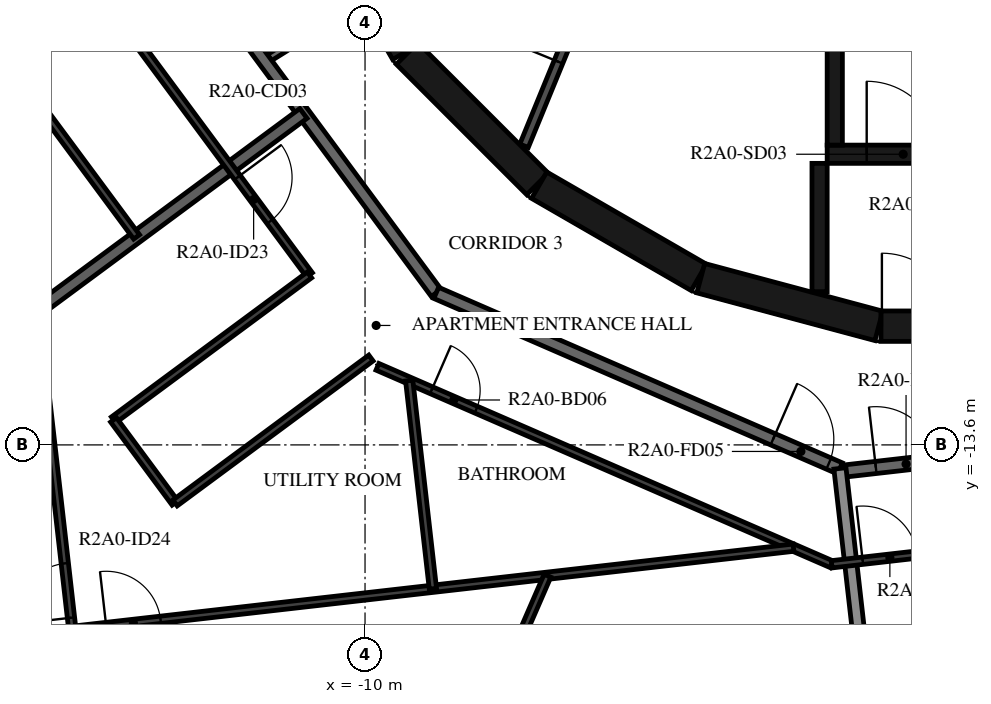
"""IFC4 building model, lengths in metres.
Left out: names, types, materials, properties, quantities, classifications, styles, units other than length and angle.
Written with IfcOpenShell. Run it as: python <this file> out.ifc"""

import sys

from ifc_helpers import new_model, si_unit, direction, frame, frame_2d, origin, place, context, subcontext, project, spatial, rectangle, extrude, element, fill, save


model = new_model("IFC4")
c1 = context("Model", 3, precision=1e-05, world=origin(), true_north=direction((0.0, 1.0)))
c2 = subcontext(c1, "Body", "Model", "MODEL_VIEW")
j1 = project(units=[si_unit("LENGTHUNIT", "METRE"), si_unit("PLANEANGLEUNIT", "RADIAN")], contexts=[c1])
p1 = place(None, origin())
s1 = spatial("IfcSite", under=j1, at=p1, CompositionType="ELEMENT")
p2 = place(p1, origin())
s2 = spatial("IfcBuilding", under=s1, at=p2, CompositionType="ELEMENT")
p3 = place(p2, frame((0.0, 0.0, 83.7)))
s3 = spatial("IfcBuildingStorey", under=s2, at=p3, CompositionType="ELEMENT", Elevation=83.7)
p4 = place(p3, frame((-10.845, -4.51, 0.0), z_axis=(0.0, 0.0, 1.0), x_axis=(0.500087131594, -0.865975092491, 0.0)))
e1 = element("IfcWall", 1, at=p4, inside=s3, PredefinedType="SHEAR", context=c2, shape_type="SweptSolid", body=[
    extrude(rectangle(XDim=3.033, YDim=0.5, at=frame_2d((1.516, 0.0))), origin(), (0.0, 0.0, 1.0), 3.12),
])
p5 = place(p3, frame((-9.308, -7.164, 0.0), z_axis=(0.0, 0.0, 1.0), x_axis=(0.707106781187, -0.707106781187, 0.0)))
e2 = element("IfcWall", 2, at=p5, inside=s3, PredefinedType="SHEAR", context=c2, shape_type="SweptSolid", body=[
    extrude(rectangle(XDim=3.032, YDim=0.5, at=frame_2d((1.516, 0.0))), origin(), (0.0, 0.0, 1.0), 3.12),
])
for number, where, z_axis, x_axis in (
    (3, (-7.137, -9.329, 0.0), (0.0, 0.0, 1.0), (0.866, -0.5, 0.0)),
    (4, (-4.479, -10.858, 0.0), (0.0, 0.0, 1.0), (0.966, -0.259, 0.0)),
):
    element("IfcWall", number, at=place(p3, frame(where, z_axis=z_axis, x_axis=x_axis)), inside=s3, PredefinedType="SHEAR", context=c2, shape_type="SweptSolid", body=[
        extrude(rectangle(XDim=3.033, YDim=0.5, at=frame_2d((1.516, 0.0))), origin(), (0.0, 0.0, 1.0), 3.12),
    ])
p6 = place(p3, frame((-1.516, -11.647, 0.0), z_axis=(0.0, 0.0, 1.0), x_axis=(1.0, 0.0, 0.0)))
e5 = element("IfcWall", 5, at=p6, inside=s3, PredefinedType="SHEAR", context=c2, shape_type="SweptSolid", body=[
    extrude(rectangle(XDim=3.033, YDim=0.5, at=frame_2d((1.516, 0.0))), origin(), (0.0, 0.0, 1.0), 3.12),
])
p7 = place(p6, frame((0.016, 0.0, 0.0)))
e6 = element("IfcOpeningElement", 6, at=p7, cuts=e5, PredefinedType="OPENING", context=c2, shape_type="SweptSolid", body=[
    extrude(rectangle(XDim=1.2, YDim=2.1, at=frame_2d((0.6, 1.05))), frame((0.0, 0.26, 0.0), z_axis=(0.0, -1.0, 0.0), x_axis=(1.0, 0.0, 0.0)), (0.0, 0.0, 1.0), 0.52),
])
p8 = place(p3, frame((-2.275, -8.67, 0.0), z_axis=(0.0, 0.0, 1.0), x_axis=(0.0, 1.0, 0.0)))
e7 = element("IfcWall", 7, at=p8, inside=s3, PredefinedType="SHEAR", context=c2, shape_type="SweptSolid", body=[
    extrude(rectangle(XDim=3.32, YDim=0.25, at=frame_2d((1.66, 0.0))), origin(), (0.0, 0.0, 1.0), 3.12),
])
p9 = place(p3, frame((-2.4, -8.82, 0.0), z_axis=(0.0, 0.0, 1.0), x_axis=(1.0, 0.0, 0.0)))
e8 = element("IfcWall", 8, at=p9, inside=s3, PredefinedType="SHEAR", context=c2, shape_type="SweptSolid", body=[
    extrude(rectangle(XDim=2.5, YDim=0.3, at=frame_2d((1.25, 0.0))), origin(), (0.0, 0.0, 1.0), 3.12),
])
p10 = place(p9, frame((0.65, 0.0, 0.0)))
e9 = element("IfcOpeningElement", 9, at=p10, cuts=e8, PredefinedType="OPENING", context=c2, shape_type="SweptSolid", body=[
    extrude(rectangle(XDim=1.2, YDim=2.1, at=frame_2d((0.6, 1.05))), frame((0.0, 0.16, 0.0), z_axis=(0.0, -1.0, 0.0), x_axis=(1.0, 0.0, 0.0)), (0.0, 0.0, 1.0), 0.32),
])
p11 = place(p3, frame((-2.525, -8.97, 0.0), z_axis=(0.0, 0.0, 1.0), x_axis=(0.0, -1.0, 0.0)))
e10 = element("IfcWall", 10, at=p11, inside=s3, PredefinedType="SHEAR", context=c2, shape_type="SweptSolid", body=[
    extrude(rectangle(XDim=2.11, YDim=0.25, at=frame_2d((1.055, 0.0))), origin(), (0.0, 0.0, 1.0), 3.12),
])
p12 = place(p3, frame((-7.385, -8.681, 0.0), z_axis=(0.0, 0.0, 1.0), x_axis=(0.379804590409, 0.925066739811, 0.0)))
e11 = element("IfcWall", 11, at=p12, inside=s3, PredefinedType="PARTITIONING", context=c2, shape_type="SweptSolid", body=[
    extrude(rectangle(XDim=3.885, YDim=0.15, at=frame_2d((1.942, 0.0))), origin(), (0.0, 0.0, 1.0), 3.12),
])
p13 = place(p12, frame((1.493, 0.0, 0.0)))
e12 = element("IfcOpeningElement", 12, at=p13, cuts=e11, PredefinedType="OPENING", context=c2, shape_type="SweptSolid", body=[
    extrude(rectangle(XDim=0.9, YDim=2.1, at=frame_2d((0.45, 1.05))), frame((0.0, 0.085, 0.0), z_axis=(0.0, -1.0, 0.0), x_axis=(1.0, 0.0, 0.0)), (0.0, 0.0, 1.0), 0.17),
])
p14 = place(p3, frame((-11.654, -7.282, 0.0), z_axis=(0.0, 0.0, 1.0), x_axis=(0.848117698675, 0.529807860638, 0.0)))
e13 = element("IfcWall", 13, at=p14, inside=s3, PredefinedType="PARTITIONING", context=c2, shape_type="SweptSolid", body=[
    extrude(rectangle(XDim=1.838, YDim=0.12, at=frame_2d((0.919, 0.0))), origin(), (0.0, 0.0, 1.0), 3.12),
])
p15 = place(p14, frame((0.115, 0.0, 0.0)))
e14 = element("IfcOpeningElement", 14, at=p15, cuts=e13, PredefinedType="OPENING", context=c2, shape_type="SweptSolid", body=[
    extrude(rectangle(XDim=1.2, YDim=2.1, at=frame_2d((0.6, 1.05))), frame((0.0, 0.07, 0.0), z_axis=(0.0, -1.0, 0.0), x_axis=(1.0, 0.0, 0.0)), (0.0, 0.0, 1.0), 0.14),
])
p16 = place(p3, frame((-13.196, -5.198, 0.0), z_axis=(0.0, 0.0, 1.0), x_axis=(0.594805187394, -0.803869883159, 0.0)))
e15 = element("IfcWall", 15, at=p16, inside=s3, PredefinedType="STANDARD", context=c2, shape_type="SweptSolid", body=[
    extrude(rectangle(XDim=7.342, YDim=0.2, at=frame_2d((3.671, 0.0))), origin(), (0.0, 0.0, 1.0), 3.12),
])
p17 = place(p3, frame((-8.829, -11.1, 0.0), z_axis=(0.0, 0.0, 1.0), x_axis=(0.917063622491, -0.398740908742, 0.0)))
e16 = element("IfcWall", 16, at=p17, inside=s3, PredefinedType="STANDARD", context=c2, shape_type="SweptSolid", body=[
    extrude(rectangle(XDim=7.24, YDim=0.2, at=frame_2d((3.62, 0.0))), origin(), (0.0, 0.0, 1.0), 3.12),
])
p18 = place(p17, frame((6.04, 0.0, 0.0)))
e17 = element("IfcOpeningElement", 17, at=p18, cuts=e16, PredefinedType="OPENING", context=c2, shape_type="SweptSolid", body=[
    extrude(rectangle(XDim=1.0, YDim=2.1, at=frame_2d((0.5, 1.05))), frame((0.0, 0.11, 0.0), z_axis=(0.0, -1.0, 0.0), x_axis=(1.0, 0.0, 0.0)), (0.0, 0.0, 1.0), 0.22),
])
p19 = place(p3, frame((-2.096, -14.028, 0.0), z_axis=(0.0, 0.0, 1.0), x_axis=(0.993569170114, 0.113226782163, 0.0)))
e18 = element("IfcWall", 18, at=p19, inside=s3, PredefinedType="STANDARD", context=c2, shape_type="SweptSolid", body=[
    extrude(rectangle(XDim=7.342, YDim=0.2, at=frame_2d((3.671, 0.0))), origin(), (0.0, 0.0, 1.0), 3.12),
])
p20 = place(p19, frame((0.5, 0.0, 0.0)))
e19 = element("IfcOpeningElement", 19, at=p20, cuts=e18, PredefinedType="OPENING", context=c2, shape_type="SweptSolid", body=[
    extrude(rectangle(XDim=1.0, YDim=2.1, at=frame_2d((0.5, 1.05))), frame((0.0, 0.11, 0.0), z_axis=(0.0, -1.0, 0.0), x_axis=(1.0, 0.0, 0.0)), (0.0, 0.0, 1.0), 0.22),
])
p21 = place(p3, frame((-15.41, -11.403, 0.0), z_axis=(0.0, 0.0, 1.0), x_axis=(0.803887568227, 0.594781285558, 0.0)))
e20 = element("IfcWall", 20, at=p21, inside=s3, PredefinedType="STANDARD", context=c2, shape_type="SweptSolid", body=[
    extrude(rectangle(XDim=5.47, YDim=0.2, at=frame_2d((2.735, 0.0))), origin(), (0.0, 0.0, 1.0), 3.12),
])
p22 = place(p3, frame((-1.555, -19.559, 0.0), z_axis=(0.0, 0.0, 1.0), x_axis=(-0.113221250863, 0.993569800443, 0.0)))
e21 = element("IfcWall", 21, at=p22, inside=s3, PredefinedType="STANDARD", context=c2, shape_type="SweptSolid", body=[
    extrude(rectangle(XDim=5.609, YDim=0.2, at=frame_2d((2.804, 0.0))), origin(), (0.0, 0.0, 1.0), 2.73),
])
p23 = place(p3, frame((-14.641, -5.767, 0.0), z_axis=(0.0, 0.0, 1.0), x_axis=(0.594825885962, -0.803854567313, 0.0)))
e22 = element("IfcWall", 22, at=p23, inside=s3, PredefinedType="PARTITIONING", context=c2, shape_type="SweptSolid", body=[
    extrude(rectangle(XDim=6.266, YDim=0.12, at=frame_2d((3.133, 0.0))), origin(), (0.0, 0.0, 1.0), 3.12),
])
p24 = place(p23, frame((4.273, 0.0, 0.0)))
e23 = element("IfcOpeningElement", 23, at=p24, cuts=e22, PredefinedType="OPENING", context=c2, shape_type="SweptSolid", body=[
    extrude(rectangle(XDim=0.9, YDim=2.1, at=frame_2d((0.45, 1.05))), frame((0.0, 0.07, 0.0), z_axis=(0.0, -1.0, 0.0), x_axis=(1.0, 0.0, 0.0)), (0.0, 0.0, 1.0), 0.14),
])
p25 = place(p3, frame((-18.084, -4.331, 0.0), z_axis=(0.0, 0.0, 1.0), x_axis=(0.594811782108, -0.803865003508, 0.0)))
e24 = element("IfcWall", 24, at=p25, inside=s3, PredefinedType="PARTITIONING", context=c2, shape_type="SweptSolid", body=[
    extrude(rectangle(XDim=7.276, YDim=0.12, at=frame_2d((3.638, 0.0))), origin(), (0.0, 0.0, 1.0), 3.12),
])
p26 = place(p3, frame((-10.914, -10.804, 0.0), z_axis=(0.0, 0.0, 1.0), x_axis=(-0.803864616889, -0.594812304609, 0.0)))
e25 = element("IfcWall", 25, at=p26, inside=s3, PredefinedType="PARTITIONING", context=c2, shape_type="SweptSolid", body=[
    extrude(rectangle(XDim=4.008, YDim=0.12, at=frame_2d((2.004, 0.0))), origin(), (0.0, 0.0, 1.0), 3.12),
])
p27 = place(p3, frame((-14.136, -13.188, 0.0), z_axis=(0.0, 0.0, 1.0), x_axis=(0.594863421241, -0.803826791087, 0.0)))
e26 = element("IfcWall", 26, at=p27, inside=s3, PredefinedType="PARTITIONING", context=c2, shape_type="SweptSolid", body=[
    extrude(rectangle(XDim=1.7, YDim=0.12, at=frame_2d((0.85, 0.0))), origin(), (0.0, 0.0, 1.0), 3.12),
])
p28 = place(p3, frame((-13.125, -14.555, 0.0), z_axis=(0.0, 0.0, 1.0), x_axis=(0.80389374229, 0.594772940799, 0.0)))
e27 = element("IfcWall", 27, at=p28, inside=s3, PredefinedType="PARTITIONING", context=c2, shape_type="SweptSolid", body=[
    extrude(rectangle(XDim=4.008, YDim=0.12, at=frame_2d((2.004, 0.0))), origin(), (0.0, 0.0, 1.0), 3.12),
])
p29 = place(p3, frame((-9.796, -12.315, 0.0), z_axis=(0.0, 0.0, 1.0), x_axis=(0.917059572812, -0.398750222463, 0.0)))
e28 = element("IfcWall", 28, at=p29, inside=s3, PredefinedType="PARTITIONING", context=c2, shape_type="SweptSolid", body=[
    extrude(rectangle(XDim=8.146, YDim=0.12, at=frame_2d((4.073, 0.0))), origin(), (0.0, 0.0, 1.0), 3.12),
])
p30 = place(p29, frame((0.969, 0.0, 0.0)))
e29 = element("IfcOpeningElement", 29, at=p30, cuts=e28, PredefinedType="OPENING", context=c2, shape_type="SweptSolid", body=[
    extrude(rectangle(XDim=0.8, YDim=2.1, at=frame_2d((0.4, 1.05))), frame((0.0, 0.07, 0.0), z_axis=(0.0, -1.0, 0.0), x_axis=(1.0, 0.0, 0.0)), (0.0, 0.0, 1.0), 0.14),
])
p31 = place(p3, frame((-2.326, -15.563, 0.0), z_axis=(0.0, 0.0, 1.0), x_axis=(0.993575068384, 0.113175012641, 0.0)))
e30 = element("IfcWall", 30, at=p31, inside=s3, PredefinedType="PARTITIONING", context=c2, shape_type="SweptSolid", body=[
    extrude(rectangle(XDim=3.799, YDim=0.12, at=frame_2d((1.899, 0.0))), origin(), (0.0, 0.0, 1.0), 3.12),
])
p32 = place(p31, frame((0.513, 0.0, 0.0)))
e31 = element("IfcOpeningElement", 31, at=p32, cuts=e30, PredefinedType="OPENING", context=c2, shape_type="SweptSolid", body=[
    extrude(rectangle(XDim=0.9, YDim=2.1, at=frame_2d((0.45, 1.05))), frame((0.0, 0.07, 0.0), z_axis=(0.0, -1.0, 0.0), x_axis=(1.0, 0.0, 0.0)), (0.0, 0.0, 1.0), 0.14),
])
p33 = place(p3, frame((-17.437, -16.94, 0.0), z_axis=(0.0, 0.0, 1.0), x_axis=(0.993573314119, 0.113190412448, 0.0)))
e32 = element("IfcWall", 32, at=p33, inside=s3, PredefinedType="PARTITIONING", context=c2, shape_type="SweptSolid", body=[
    extrude(rectangle(XDim=14.576, YDim=0.12, at=frame_2d((7.288, 0.0))), origin(), (0.0, 0.0, 1.0), 3.12),
])
p34 = place(p33, frame((3.201, 0.0, 0.0)))
e33 = element("IfcOpeningElement", 33, at=p34, cuts=e32, PredefinedType="OPENING", context=c2, shape_type="SweptSolid", body=[
    extrude(rectangle(XDim=0.9, YDim=2.1, at=frame_2d((0.45, 1.05))), frame((0.0, 0.07, 0.0), z_axis=(0.0, -1.0, 0.0), x_axis=(1.0, 0.0, 0.0)), (0.0, 0.0, 1.0), 0.14),
])
p35 = place(p33, frame((0.645, 0.0, 0.0)))
e34 = element("IfcOpeningElement", 34, at=p35, cuts=e32, PredefinedType="OPENING", context=c2, shape_type="SweptSolid", body=[
    extrude(rectangle(XDim=0.9, YDim=2.1, at=frame_2d((0.45, 1.05))), frame((0.0, 0.07, 0.0), z_axis=(0.0, -1.0, 0.0), x_axis=(1.0, 0.0, 0.0)), (0.0, 0.0, 1.0), 0.14),
])
p36 = place(p3, frame((-14.813, -16.641, 0.0), z_axis=(0.0, 0.0, 1.0), x_axis=(-0.113210971478, 0.993570971767, 0.0)))
e35 = element("IfcWall", 35, at=p36, inside=s3, PredefinedType="PARTITIONING", context=c2, shape_type="SweptSolid", body=[
    extrude(rectangle(XDim=5.273, YDim=0.12, at=frame_2d((2.636, 0.0))), origin(), (0.0, 0.0, 1.0), 3.12),
])
p37 = place(p36, frame((0.2, 0.0, 0.0)))
e36 = element("IfcOpeningElement", 36, at=p37, cuts=e35, PredefinedType="OPENING", context=c2, shape_type="SweptSolid", body=[
    extrude(rectangle(XDim=0.9, YDim=2.1, at=frame_2d((0.45, 1.05))), frame((0.0, 0.07, 0.0), z_axis=(0.0, -1.0, 0.0), x_axis=(1.0, 0.0, 0.0)), (0.0, 0.0, 1.0), 0.14),
])
p38 = place(p3, frame((-8.884, -15.966, 0.0), z_axis=(0.0, 0.0, 1.0), x_axis=(-0.113230836929, 0.993568708026, 0.0)))
e37 = element("IfcWall", 37, at=p38, inside=s3, PredefinedType="PARTITIONING", context=c2, shape_type="SweptSolid", body=[
    extrude(rectangle(XDim=3.446, YDim=0.12, at=frame_2d((1.723, 0.0))), origin(), (0.0, 0.0, 1.0), 3.12),
])
p39 = place(p3, frame((-9.026, -20.41, 0.0), z_axis=(0.0, 0.0, 1.0), x_axis=(0.398750711167, 0.917059360316, 0.0)))
e38 = element("IfcWall", 38, at=p39, inside=s3, PredefinedType="PARTITIONING", context=c2, shape_type="SweptSolid", body=[
    extrude(rectangle(XDim=5.081, YDim=0.12, at=frame_2d((2.54, 0.0))), origin(), (0.0, 0.0, 1.0), 3.12),
])
p40 = place(p39, frame((0.4, 0.0, 0.0)))
e39 = element("IfcOpeningElement", 39, at=p40, cuts=e38, PredefinedType="OPENING", context=c2, shape_type="SweptSolid", body=[
    extrude(rectangle(XDim=0.9, YDim=2.1, at=frame_2d((0.45, 1.05))), frame((0.0, 0.07, 0.0), z_axis=(0.0, -1.0, 0.0), x_axis=(1.0, 0.0, 0.0)), (0.0, 0.0, 1.0), 0.14),
])
p41 = place(p10, origin())
e40 = element("IfcDoor", 40, at=p41, inside=s3, OperationType="SINGLE_SWING_LEFT", PredefinedType="DOOR", context=c2, shape_type="SweptSolid", body=[
    extrude(rectangle(XDim=1.2, YDim=2.1, at=frame_2d((0.6, 1.05))), frame((0.0, 0.025, 0.0), z_axis=(0.0, -1.0, 0.0), x_axis=(1.0, 0.0, 0.0)), (0.0, 0.0, 1.0), 0.05),
])
fill(e9, e40)
p42 = place(p7, origin())
e41 = element("IfcDoor", 41, at=p42, inside=s3, OperationType="SINGLE_SWING_RIGHT", PredefinedType="DOOR", context=c2, shape_type="SweptSolid", body=[
    extrude(rectangle(XDim=1.2, YDim=2.1, at=frame_2d((0.6, 1.05))), frame((0.0, 0.025, 0.0), z_axis=(0.0, -1.0, 0.0), x_axis=(1.0, 0.0, 0.0)), (0.0, 0.0, 1.0), 0.05),
])
fill(e6, e41)
p43 = place(p13, origin())
e42 = element("IfcDoor", 42, at=p43, inside=s3, OperationType="SINGLE_SWING_LEFT", PredefinedType="DOOR", context=c2, shape_type="SweptSolid", body=[
    extrude(rectangle(XDim=0.9, YDim=2.1, at=frame_2d((0.45, 1.05))), frame((0.0, 0.025, 0.0), z_axis=(0.0, -1.0, 0.0), x_axis=(1.0, 0.0, 0.0)), (0.0, 0.0, 1.0), 0.05),
])
fill(e12, e42)
p44 = place(p18, origin())
e43 = element("IfcDoor", 43, at=p44, inside=s3, OperationType="SINGLE_SWING_LEFT", PredefinedType="DOOR", context=c2, shape_type="SweptSolid", body=[
    extrude(rectangle(XDim=1.0, YDim=2.1, at=frame_2d((0.5, 1.05))), frame((0.0, 0.025, 0.0), z_axis=(0.0, -1.0, 0.0), x_axis=(1.0, 0.0, 0.0)), (0.0, 0.0, 1.0), 0.05),
])
fill(e17, e43)
p45 = place(p24, origin())
e44 = element("IfcDoor", 44, at=p45, inside=s3, OperationType="SINGLE_SWING_LEFT", PredefinedType="DOOR", context=c2, shape_type="SweptSolid", body=[
    extrude(rectangle(XDim=0.9, YDim=2.1, at=frame_2d((0.45, 1.05))), frame((0.0, 0.025, 0.0), z_axis=(0.0, -1.0, 0.0), x_axis=(1.0, 0.0, 0.0)), (0.0, 0.0, 1.0), 0.05),
])
fill(e23, e44)
p46 = place(p30, origin())
e45 = element("IfcDoor", 45, at=p46, inside=s3, OperationType="SINGLE_SWING_LEFT", PredefinedType="DOOR", context=c2, shape_type="SweptSolid", body=[
    extrude(rectangle(XDim=0.8, YDim=2.1, at=frame_2d((0.4, 1.05))), frame((0.0, 0.025, 0.0), z_axis=(0.0, -1.0, 0.0), x_axis=(1.0, 0.0, 0.0)), (0.0, 0.0, 1.0), 0.05),
])
fill(e29, e45)
p47 = place(p37, origin())
e46 = element("IfcDoor", 46, at=p47, inside=s3, OperationType="SINGLE_SWING_LEFT", PredefinedType="DOOR", context=c2, shape_type="SweptSolid", body=[
    extrude(rectangle(XDim=0.9, YDim=2.1, at=frame_2d((0.45, 1.05))), frame((0.0, 0.025, 0.0), z_axis=(0.0, -1.0, 0.0), x_axis=(1.0, 0.0, 0.0)), (0.0, 0.0, 1.0), 0.05),
])
fill(e36, e46)
p48 = place(p34, origin())
e47 = element("IfcDoor", 47, at=p48, inside=s3, OperationType="SINGLE_SWING_LEFT", PredefinedType="DOOR", context=c2, shape_type="SweptSolid", body=[
    extrude(rectangle(XDim=0.9, YDim=2.1, at=frame_2d((0.45, 1.05))), frame((0.0, 0.025, 0.0), z_axis=(0.0, -1.0, 0.0), x_axis=(1.0, 0.0, 0.0)), (0.0, 0.0, 1.0), 0.05),
])
fill(e33, e47)
p49 = place(p20, origin())
e48 = element("IfcDoor", 48, at=p49, inside=s3, OperationType="SINGLE_SWING_LEFT", PredefinedType="DOOR", context=c2, shape_type="SweptSolid", body=[
    extrude(rectangle(XDim=1.0, YDim=2.1, at=frame_2d((0.5, 1.05))), frame((0.0, 0.025, 0.0), z_axis=(0.0, -1.0, 0.0), x_axis=(1.0, 0.0, 0.0)), (0.0, 0.0, 1.0), 0.05),
])
fill(e19, e48)
p50 = place(p32, origin())
e49 = element("IfcDoor", 49, at=p50, inside=s3, OperationType="SINGLE_SWING_LEFT", PredefinedType="DOOR", context=c2, shape_type="SweptSolid", body=[
    extrude(rectangle(XDim=0.9, YDim=2.1, at=frame_2d((0.45, 1.05))), frame((0.0, 0.025, 0.0), z_axis=(0.0, -1.0, 0.0), x_axis=(1.0, 0.0, 0.0)), (0.0, 0.0, 1.0), 0.05),
])
fill(e31, e49)
p51 = place(p15, origin())
e50 = element("IfcDoor", 50, at=p51, inside=s3, OperationType="DOUBLE_DOOR_SINGLE_SWING", PredefinedType="DOOR", context=c2, shape_type="SweptSolid", body=[
    extrude(rectangle(XDim=1.2, YDim=2.1, at=frame_2d((0.6, 1.05))), frame((0.0, 0.025, 0.0), z_axis=(0.0, -1.0, 0.0), x_axis=(1.0, 0.0, 0.0)), (0.0, 0.0, 1.0), 0.05),
])
fill(e14, e50)
save(model, sys.argv[1])
